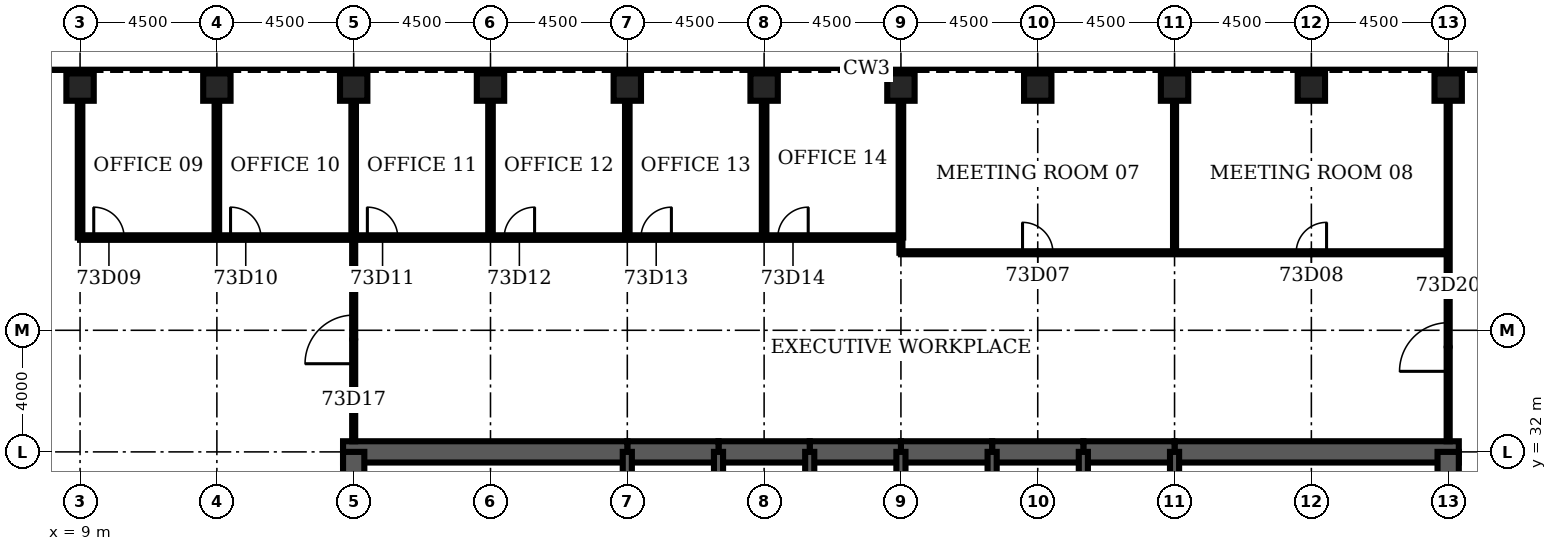
"""IFC4 building model, lengths in metres.
Left out: names, types, materials, properties, quantities, classifications, styles, units other than length and angle.
Written with IfcOpenShell. Run it as: python <this file> out.ifc"""

import sys

from ifc_helpers import new_model, si_unit, direction, frame, frame_2d, origin, origin_2d, place, context, subcontext, project, spatial, rectangle, hollow_rectangle, extrude, element, fill, save


model = new_model("IFC4")
c1 = context("Model", 3, precision=1e-05, world=origin(), true_north=direction((0.0, 1.0)))
c2 = subcontext(c1, "Body", "Model", "MODEL_VIEW")
j1 = project(units=[si_unit("LENGTHUNIT", "METRE"), si_unit("PLANEANGLEUNIT", "RADIAN")], contexts=[c1])
p1 = place(None, origin())
s1 = spatial("IfcSite", under=j1, at=p1, CompositionType="ELEMENT")
p2 = place(p1, origin())
s2 = spatial("IfcBuilding", under=s1, at=p2, CompositionType="ELEMENT")
p3 = place(p2, frame((0.0, 0.0, 321.5)))
s3 = spatial("IfcBuildingStorey", under=s2, at=p3, CompositionType="ELEMENT", Elevation=321.5)
for number, where, z_axis, x_axis in (
    (1, (54.0, 44.0, 0.0), (0.0, 0.0, 1.0), (0.0, 1.0, 0.0)),
    (2, (49.5, 44.0, 0.0), (0.0, 0.0, 1.0), (0.0, 1.0, 0.0)),
    (3, (45.0, 44.0, 0.0), (0.0, 0.0, 1.0), (0.0, 1.0, 0.0)),
    (4, (40.5, 44.0, 0.0), (0.0, 0.0, 1.0), (0.0, 1.0, 0.0)),
    (5, (36.0, 44.0, 0.0), (0.0, 0.0, 1.0), (0.0, 1.0, 0.0)),
    (6, (31.5, 44.0, 0.0), (0.0, 0.0, 1.0), (0.0, 1.0, 0.0)),
    (7, (27.0, 44.0, 0.0), (0.0, 0.0, 1.0), (0.0, 1.0, 0.0)),
    (8, (22.5, 44.0, 0.0), (0.0, 0.0, 1.0), (0.0, 1.0, 0.0)),
    (9, (18.0, 44.0, 0.0), (0.0, 0.0, 1.0), (0.0, 1.0, 0.0)),
    (10, (13.5, 44.0, 0.0), (0.0, 0.0, 1.0), (0.0, 1.0, 0.0)),
    (11, (9.0, 44.0, 0.0), (0.0, 0.0, 1.0), (0.0, 1.0, 0.0)),
):
    element("IfcColumn", number, at=place(p3, frame(where, z_axis=z_axis, x_axis=x_axis)), inside=s3, PredefinedType="COLUMN", context=c2, shape_type="SweptSolid", body=[
        extrude(hollow_rectangle(XDim=0.9, YDim=0.9, WallThickness=0.05, at=origin_2d()), origin(), (0.0, 0.0, 1.0), 4.2),
    ])
p4 = place(p3, frame((54.35, 32.0, 0.0), z_axis=(0.0, 0.0, 1.0), x_axis=(-1.0, 0.0, 0.0)))
e12 = element("IfcWall", 12, at=p4, inside=s3, PredefinedType="SHEAR", context=c2, shape_type="SweptSolid", body=[
    extrude(rectangle(XDim=9.35, YDim=0.7, at=frame_2d((4.675, 0.0))), origin(), (0.0, 0.0, 1.0), 4.2),
])
for number, where, z_axis, x_axis in (
    (13, (45.0, 32.0, 0.0), (0.0, 0.0, 1.0), (-1.0, 0.0, 0.0)),
    (14, (42.0, 32.0, 0.0), (0.0, 0.0, 1.0), (-1.0, 0.0, 0.0)),
    (15, (39.0, 32.0, 0.0), (0.0, 0.0, 1.0), (-1.0, 0.0, 0.0)),
    (16, (36.0, 32.0, 0.0), (0.0, 0.0, 1.0), (-1.0, 0.0, 0.0)),
    (17, (33.0, 32.0, 0.0), (0.0, 0.0, 1.0), (-1.0, 0.0, 0.0)),
    (18, (30.0, 32.0, 0.0), (0.0, 0.0, 1.0), (-1.0, 0.0, 0.0)),
):
    element("IfcWall", number, at=place(p3, frame(where, z_axis=z_axis, x_axis=x_axis)), inside=s3, PredefinedType="SHEAR", context=c2, shape_type="SweptSolid", body=[
        extrude(rectangle(XDim=3.0, YDim=0.7, at=frame_2d((1.5, 0.0))), origin(), (0.0, 0.0, 1.0), 4.2),
    ])
p5 = place(p3, frame((27.0, 32.0, 0.0), z_axis=(0.0, 0.0, 1.0), x_axis=(-1.0, 0.0, 0.0)))
e19 = element("IfcWall", 19, at=p5, inside=s3, PredefinedType="SHEAR", context=c2, shape_type="SweptSolid", body=[
    extrude(rectangle(XDim=9.35, YDim=0.7, at=frame_2d((4.675, 0.0))), origin(), (0.0, 0.0, 1.0), 4.2),
])
for number, where, z_axis, x_axis in (
    (20, (18.0, 32.0, 0.0), (0.0, 0.0, 1.0), (0.0, -1.0, 0.0)),
    (21, (54.0, 28.8, 0.0), (0.0, 0.0, 1.0), (0.0, 1.0, 0.0)),
):
    element("IfcWall", number, at=place(p3, frame(where, z_axis=z_axis, x_axis=x_axis)), inside=s3, PredefinedType="SHEAR", context=c2, shape_type="SweptSolid", body=[
        extrude(rectangle(XDim=3.2, YDim=0.7, at=frame_2d((1.6, 0.0))), origin(), (0.0, 0.0, 1.0), 4.2),
    ])
for number, where, z_axis, x_axis in (
    (22, (27.0, 28.8, 0.0), (0.0, 0.0, 1.0), (0.0, 1.0, 0.0)),
    (23, (30.0, 28.8, 0.0), (0.0, 0.0, 1.0), (0.0, 1.0, 0.0)),
    (24, (33.0, 28.8, 0.0), (0.0, 0.0, 1.0), (0.0, 1.0, 0.0)),
    (25, (36.0, 28.8, 0.0), (0.0, 0.0, 1.0), (0.0, 1.0, 0.0)),
    (26, (39.0, 28.8, 0.0), (0.0, 0.0, 1.0), (0.0, 1.0, 0.0)),
    (27, (42.0, 28.8, 0.0), (0.0, 0.0, 1.0), (0.0, 1.0, 0.0)),
    (28, (45.0, 28.8, 0.0), (0.0, 0.0, 1.0), (0.0, 1.0, 0.0)),
):
    element("IfcWall", number, at=place(p3, frame(where, z_axis=z_axis, x_axis=x_axis)), inside=s3, PredefinedType="SOLIDWALL", context=c2, shape_type="SweptSolid", body=[
        extrude(rectangle(XDim=3.2, YDim=0.3, at=frame_2d((1.6, 0.0))), origin(), (0.0, 0.0, 1.0), 4.2),
    ])
p6 = place(p3, frame((36.0, 38.55, 0.0), z_axis=(0.0, 0.0, 1.0), x_axis=(1.0, 0.0, 0.0)))
e29 = element("IfcWall", 29, at=p6, inside=s3, PredefinedType="PARTITIONING", context=c2, shape_type="SweptSolid", body=[
    extrude(rectangle(XDim=18.0, YDim=0.1, at=frame_2d((9.0, 0.0))), origin(), (0.0, 0.0, 1.0), 3.0),
])
p7 = place(p6, frame((4.0, 0.0, 0.0)))
e30 = element("IfcOpeningElement", 30, at=p7, cuts=e29, PredefinedType="OPENING", context=c2, shape_type="SweptSolid", body=[
    extrude(rectangle(XDim=1.0, YDim=2.1, at=frame_2d((0.5, 1.05))), frame((0.0, 0.06, 0.0), z_axis=(0.0, -1.0, 0.0), x_axis=(1.0, 0.0, 0.0)), (0.0, 0.0, 1.0), 0.12),
])
p8 = place(p6, frame((13.0, 0.0, 0.0)))
e31 = element("IfcOpeningElement", 31, at=p8, cuts=e29, PredefinedType="OPENING", context=c2, shape_type="SweptSolid", body=[
    extrude(rectangle(XDim=1.0, YDim=2.1, at=frame_2d((0.5, 1.05))), frame((0.0, 0.06, 0.0), z_axis=(0.0, -1.0, 0.0), x_axis=(1.0, 0.0, 0.0)), (0.0, 0.0, 1.0), 0.12),
])
p9 = place(p3, frame((9.0, 39.05, 0.0), z_axis=(0.0, 0.0, 1.0), x_axis=(1.0, 0.0, 0.0)))
e32 = element("IfcWall", 32, at=p9, inside=s3, PredefinedType="PARTITIONING", context=c2, shape_type="SweptSolid", body=[
    extrude(rectangle(XDim=27.0, YDim=0.15, at=frame_2d((13.5, 0.0))), origin(), (0.0, 0.0, 1.0), 3.0),
])
p10 = place(p9, frame((0.45, 0.0, 0.0)))
e33 = element("IfcOpeningElement", 33, at=p10, cuts=e32, PredefinedType="OPENING", context=c2, shape_type="SweptSolid", body=[
    extrude(rectangle(XDim=1.0, YDim=2.1, at=frame_2d((0.5, 1.05))), frame((0.0, 0.085, 0.0), z_axis=(0.0, -1.0, 0.0), x_axis=(1.0, 0.0, 0.0)), (0.0, 0.0, 1.0), 0.17),
])
p11 = place(p9, frame((4.95, 0.0, 0.0)))
e34 = element("IfcOpeningElement", 34, at=p11, cuts=e32, PredefinedType="OPENING", context=c2, shape_type="SweptSolid", body=[
    extrude(rectangle(XDim=1.0, YDim=2.1, at=frame_2d((0.5, 1.05))), frame((0.0, 0.085, 0.0), z_axis=(0.0, -1.0, 0.0), x_axis=(1.0, 0.0, 0.0)), (0.0, 0.0, 1.0), 0.17),
])
p12 = place(p9, frame((9.45, 0.0, 0.0)))
e35 = element("IfcOpeningElement", 35, at=p12, cuts=e32, PredefinedType="OPENING", context=c2, shape_type="SweptSolid", body=[
    extrude(rectangle(XDim=1.0, YDim=2.1, at=frame_2d((0.5, 1.05))), frame((0.0, 0.085, 0.0), z_axis=(0.0, -1.0, 0.0), x_axis=(1.0, 0.0, 0.0)), (0.0, 0.0, 1.0), 0.17),
])
p13 = place(p9, frame((13.95, 0.0, 0.0)))
e36 = element("IfcOpeningElement", 36, at=p13, cuts=e32, PredefinedType="OPENING", context=c2, shape_type="SweptSolid", body=[
    extrude(rectangle(XDim=1.0, YDim=2.1, at=frame_2d((0.5, 1.05))), frame((0.0, 0.085, 0.0), z_axis=(0.0, -1.0, 0.0), x_axis=(1.0, 0.0, 0.0)), (0.0, 0.0, 1.0), 0.17),
])
p14 = place(p9, frame((18.45, 0.0, 0.0)))
e37 = element("IfcOpeningElement", 37, at=p14, cuts=e32, PredefinedType="OPENING", context=c2, shape_type="SweptSolid", body=[
    extrude(rectangle(XDim=1.0, YDim=2.1, at=frame_2d((0.5, 1.05))), frame((0.0, 0.085, 0.0), z_axis=(0.0, -1.0, 0.0), x_axis=(1.0, 0.0, 0.0)), (0.0, 0.0, 1.0), 0.17),
])
p15 = place(p9, frame((22.95, 0.0, 0.0)))
e38 = element("IfcOpeningElement", 38, at=p15, cuts=e32, PredefinedType="OPENING", context=c2, shape_type="SweptSolid", body=[
    extrude(rectangle(XDim=1.0, YDim=2.1, at=frame_2d((0.5, 1.05))), frame((0.0, 0.085, 0.0), z_axis=(0.0, -1.0, 0.0), x_axis=(1.0, 0.0, 0.0)), (0.0, 0.0, 1.0), 0.17),
])
for number, where, z_axis, x_axis in (
    (39, (9.0, 39.05, 0.0), (0.0, 0.0, 1.0), (0.0, 1.0, 0.0)),
    (40, (13.5, 39.05, 0.0), (0.0, 0.0, 1.0), (0.0, 1.0, 0.0)),
):
    element("IfcWall", number, at=place(p3, frame(where, z_axis=z_axis, x_axis=x_axis)), inside=s3, PredefinedType="PARTITIONING", context=c2, shape_type="SweptSolid", body=[
        extrude(rectangle(XDim=4.5, YDim=0.15, at=frame_2d((2.25, 0.0))), origin(), (0.0, 0.0, 1.0), 3.0),
    ])
p16 = place(p3, frame((18.0, 32.35, 0.0), z_axis=(0.0, 0.0, 1.0), x_axis=(0.0, 1.0, 0.0)))
e41 = element("IfcWall", 41, at=p16, inside=s3, PredefinedType="PARTITIONING", context=c2, shape_type="SweptSolid", body=[
    extrude(rectangle(XDim=6.7, YDim=0.1, at=frame_2d((3.35, 0.0))), origin(), (0.0, 0.0, 1.0), 3.0),
])
p17 = place(p16, frame((2.55, 0.0, 0.0)))
e42 = element("IfcOpeningElement", 42, at=p17, cuts=e41, PredefinedType="OPENING", context=c2, shape_type="SweptSolid", body=[
    extrude(rectangle(XDim=1.6, YDim=2.1, at=frame_2d((0.8, 1.05))), frame((0.0, 0.06, 0.0), z_axis=(0.0, -1.0, 0.0), x_axis=(1.0, 0.0, 0.0)), (0.0, 0.0, 1.0), 0.12),
])
for number, where, z_axis, x_axis in (
    (43, (18.0, 39.05, 0.0), (0.0, 0.0, 1.0), (0.0, 1.0, 0.0)),
    (44, (22.5, 39.05, 0.0), (0.0, 0.0, 1.0), (0.0, 1.0, 0.0)),
    (45, (27.0, 39.05, 0.0), (0.0, 0.0, 1.0), (0.0, 1.0, 0.0)),
    (46, (31.5, 39.05, 0.0), (0.0, 0.0, 1.0), (0.0, 1.0, 0.0)),
):
    element("IfcWall", number, at=place(p3, frame(where, z_axis=z_axis, x_axis=x_axis)), inside=s3, PredefinedType="PARTITIONING", context=c2, shape_type="SweptSolid", body=[
        extrude(rectangle(XDim=4.5, YDim=0.15, at=frame_2d((2.25, 0.0))), origin(), (0.0, 0.0, 1.0), 3.0),
    ])
p18 = place(p3, frame((36.0, 38.55, 0.0), z_axis=(0.0, 0.0, 1.0), x_axis=(0.0, 1.0, 0.0)))
e47 = element("IfcWall", 47, at=p18, inside=s3, PredefinedType="PARTITIONING", context=c2, shape_type="SweptSolid", body=[
    extrude(rectangle(XDim=0.5, YDim=0.1, at=frame_2d((0.25, 0.0))), origin(), (0.0, 0.0, 1.0), 3.0),
])
p19 = place(p3, frame((36.0, 39.05, 0.0), z_axis=(0.0, 0.0, 1.0), x_axis=(0.0, 1.0, 0.0)))
e48 = element("IfcWall", 48, at=p19, inside=s3, PredefinedType="PARTITIONING", context=c2, shape_type="SweptSolid", body=[
    extrude(rectangle(XDim=4.5, YDim=0.15, at=frame_2d((2.25, 0.0))), origin(), (0.0, 0.0, 1.0), 3.0),
])
p20 = place(p3, frame((45.0, 38.55, 0.0), z_axis=(0.0, 0.0, 1.0), x_axis=(0.0, 1.0, 0.0)))
e49 = element("IfcWall", 49, at=p20, inside=s3, PredefinedType="PARTITIONING", context=c2, shape_type="SweptSolid", body=[
    extrude(rectangle(XDim=5.0, YDim=0.1, at=frame_2d((2.5, 0.0))), origin(), (0.0, 0.0, 1.0), 3.0),
])
p21 = place(p3, frame((54.0, 32.35, 0.0), z_axis=(0.0, 0.0, 1.0), x_axis=(0.0, 1.0, 0.0)))
e50 = element("IfcWall", 50, at=p21, inside=s3, PredefinedType="PARTITIONING", context=c2, shape_type="SweptSolid", body=[
    extrude(rectangle(XDim=11.2, YDim=0.1, at=frame_2d((5.6, 0.0))), origin(), (0.0, 0.0, 1.0), 3.0),
])
p22 = place(p21, frame((2.3, 0.0, 0.0)))
e51 = element("IfcOpeningElement", 51, at=p22, cuts=e50, PredefinedType="OPENING", context=c2, shape_type="SweptSolid", body=[
    extrude(rectangle(XDim=1.6, YDim=2.1, at=frame_2d((0.8, 1.05))), frame((0.0, 0.06, 0.0), z_axis=(0.0, -1.0, 0.0), x_axis=(1.0, 0.0, 0.0)), (0.0, 0.0, 1.0), 0.12),
])
p23 = place(p7, origin())
e52 = element("IfcDoor", 52, at=p23, inside=s3, OperationType="SINGLE_SWING_LEFT", PredefinedType="DOOR", context=c2, shape_type="SweptSolid", body=[
    extrude(rectangle(XDim=1.0, YDim=2.1, at=frame_2d((0.5, 1.05))), frame((0.0, 0.025, 0.0), z_axis=(0.0, -1.0, 0.0), x_axis=(1.0, 0.0, 0.0)), (0.0, 0.0, 1.0), 0.05),
])
fill(e30, e52)
p24 = place(p8, origin())
e53 = element("IfcDoor", 53, at=p24, inside=s3, OperationType="SINGLE_SWING_RIGHT", PredefinedType="DOOR", context=c2, shape_type="SweptSolid", body=[
    extrude(rectangle(XDim=1.0, YDim=2.1, at=frame_2d((0.5, 1.05))), frame((0.0, 0.025, 0.0), z_axis=(0.0, -1.0, 0.0), x_axis=(1.0, 0.0, 0.0)), (0.0, 0.0, 1.0), 0.05),
])
fill(e31, e53)
p25 = place(p10, origin())
e54 = element("IfcDoor", 54, at=p25, inside=s3, OperationType="SINGLE_SWING_LEFT", PredefinedType="DOOR", context=c2, shape_type="SweptSolid", body=[
    extrude(rectangle(XDim=1.0, YDim=2.1, at=frame_2d((0.5, 1.05))), frame((0.0, 0.025, 0.0), z_axis=(0.0, -1.0, 0.0), x_axis=(1.0, 0.0, 0.0)), (0.0, 0.0, 1.0), 0.05),
])
fill(e33, e54)
p26 = place(p11, origin())
e55 = element("IfcDoor", 55, at=p26, inside=s3, OperationType="SINGLE_SWING_LEFT", PredefinedType="DOOR", context=c2, shape_type="SweptSolid", body=[
    extrude(rectangle(XDim=1.0, YDim=2.1, at=frame_2d((0.5, 1.05))), frame((0.0, 0.025, 0.0), z_axis=(0.0, -1.0, 0.0), x_axis=(1.0, 0.0, 0.0)), (0.0, 0.0, 1.0), 0.05),
])
fill(e34, e55)
p27 = place(p12, origin())
e56 = element("IfcDoor", 56, at=p27, inside=s3, OperationType="SINGLE_SWING_LEFT", PredefinedType="DOOR", context=c2, shape_type="SweptSolid", body=[
    extrude(rectangle(XDim=1.0, YDim=2.1, at=frame_2d((0.5, 1.05))), frame((0.0, 0.025, 0.0), z_axis=(0.0, -1.0, 0.0), x_axis=(1.0, 0.0, 0.0)), (0.0, 0.0, 1.0), 0.05),
])
fill(e35, e56)
p28 = place(p13, origin())
e57 = element("IfcDoor", 57, at=p28, inside=s3, OperationType="SINGLE_SWING_RIGHT", PredefinedType="DOOR", context=c2, shape_type="SweptSolid", body=[
    extrude(rectangle(XDim=1.0, YDim=2.1, at=frame_2d((0.5, 1.05))), frame((0.0, 0.025, 0.0), z_axis=(0.0, -1.0, 0.0), x_axis=(1.0, 0.0, 0.0)), (0.0, 0.0, 1.0), 0.05),
])
fill(e36, e57)
p29 = place(p14, origin())
e58 = element("IfcDoor", 58, at=p29, inside=s3, OperationType="SINGLE_SWING_RIGHT", PredefinedType="DOOR", context=c2, shape_type="SweptSolid", body=[
    extrude(rectangle(XDim=1.0, YDim=2.1, at=frame_2d((0.5, 1.05))), frame((0.0, 0.025, 0.0), z_axis=(0.0, -1.0, 0.0), x_axis=(1.0, 0.0, 0.0)), (0.0, 0.0, 1.0), 0.05),
])
fill(e37, e58)
p30 = place(p15, origin())
e59 = element("IfcDoor", 59, at=p30, inside=s3, OperationType="SINGLE_SWING_RIGHT", PredefinedType="DOOR", context=c2, shape_type="SweptSolid", body=[
    extrude(rectangle(XDim=1.0, YDim=2.1, at=frame_2d((0.5, 1.05))), frame((0.0, 0.025, 0.0), z_axis=(0.0, -1.0, 0.0), x_axis=(1.0, 0.0, 0.0)), (0.0, 0.0, 1.0), 0.05),
])
fill(e38, e59)
p31 = place(p17, origin())
e60 = element("IfcDoor", 60, at=p31, inside=s3, OperationType="SINGLE_SWING_LEFT", PredefinedType="DOOR", context=c2, shape_type="SweptSolid", body=[
    extrude(rectangle(XDim=1.6, YDim=2.1, at=frame_2d((0.8, 1.05))), frame((0.0, 0.025, 0.0), z_axis=(0.0, -1.0, 0.0), x_axis=(1.0, 0.0, 0.0)), (0.0, 0.0, 1.0), 0.05),
])
fill(e42, e60)
p32 = place(p22, origin())
e61 = element("IfcDoor", 61, at=p32, inside=s3, OperationType="SINGLE_SWING_LEFT", PredefinedType="DOOR", context=c2, shape_type="SweptSolid", body=[
    extrude(rectangle(XDim=1.6, YDim=2.1, at=frame_2d((0.8, 1.05))), frame((0.0, 0.025, 0.0), z_axis=(0.0, -1.0, 0.0), x_axis=(1.0, 0.0, 0.0)), (0.0, 0.0, 1.0), 0.05),
])
fill(e51, e61)
save(model, sys.argv[1])
